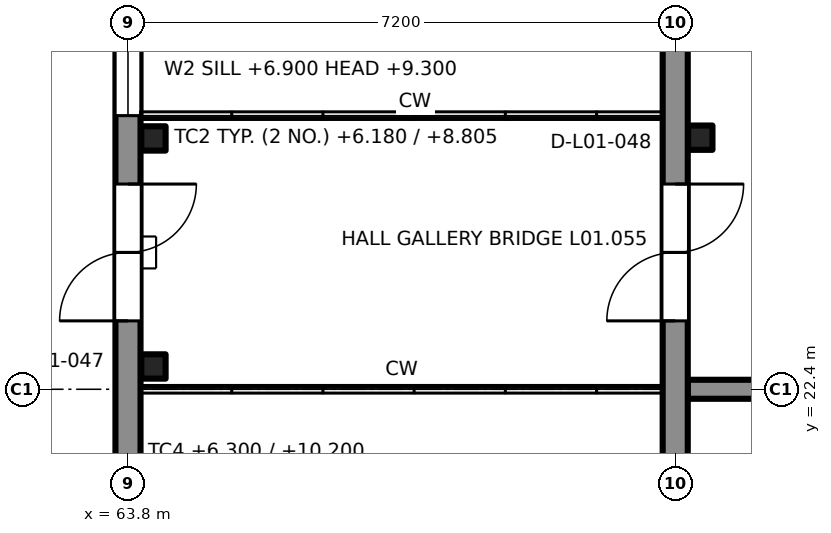
"""IFC4 building model, lengths in metres.
Left out: names, types, materials, properties, quantities, classifications, styles, units other than length and angle.
Written with IfcOpenShell. Run it as: python <this file> out.ifc"""

import sys

from ifc_helpers import new_model, si_unit, direction, frame, frame_2d, origin, origin_2d, place, context, subcontext, project, spatial, rectangle, extrude, element, fill, save


model = new_model("IFC4")
c1 = context("Model", 3, precision=1e-05, world=origin(), true_north=direction((0.0, 1.0)))
c2 = subcontext(c1, "Body", "Model", "MODEL_VIEW")
j1 = project(units=[si_unit("LENGTHUNIT", "METRE"), si_unit("PLANEANGLEUNIT", "RADIAN")], contexts=[c1])
p1 = place(None, origin())
s1 = spatial("IfcSite", under=j1, at=p1, CompositionType="ELEMENT")
p2 = place(p1, origin())
s2 = spatial("IfcBuilding", under=s1, at=p2, CompositionType="ELEMENT")
p3 = place(p2, frame((0.0, 0.0, 6.3)))
s3 = spatial("IfcBuildingStorey", under=s2, at=p3, CompositionType="ELEMENT", Elevation=6.3)
for number, where, z_axis, x_axis in (
    (1, (64.135, 22.7, -0.12), (0.0, 0.0, 1.0), (1.0, 0.0, 0.0)),
    (2, (64.135, 25.7, -0.12), (0.0, 0.0, 1.0), (1.0, 0.0, 0.0)),
):
    element("IfcColumn", number, at=place(p3, frame(where, z_axis=z_axis, x_axis=x_axis)), inside=s3, PredefinedType="COLUMN", context=c2, shape_type="SweptSolid", body=[
        extrude(rectangle(XDim=0.32, YDim=0.32, at=origin_2d()), origin(), (0.0, 0.0, 1.0), 2.625),
    ])
p4 = place(p3, frame((71.33, 25.71, 0.0), z_axis=(0.0, 0.0, 1.0), x_axis=(1.0, 0.0, 0.0)))
e3 = element("IfcColumn", 3, at=p4, inside=s3, PredefinedType="COLUMN", context=c2, shape_type="SweptSolid", body=[
    extrude(rectangle(XDim=0.32, YDim=0.32, at=origin_2d()), origin(), (0.0, 0.0, 1.0), 2.505),
])
p5 = place(p3, frame((71.165, 22.4, 0.0), z_axis=(0.0, 0.0, 1.0), x_axis=(1.0, 0.0, 0.0)))
e4 = element("IfcWall", 4, at=p5, inside=s3, PredefinedType="SHEAR", context=c2, shape_type="SweptSolid", body=[
    extrude(rectangle(XDim=6.855, YDim=0.25, at=frame_2d((3.427, 0.0))), origin(), (0.0, 0.0, 1.0), 3.65),
])
p6 = place(p5, frame((0.955, 0.0, 0.0)))
e5 = element("IfcOpeningElement", 5, at=p6, cuts=e4, PredefinedType="OPENING", context=c2, shape_type="SweptSolid", body=[
    extrude(rectangle(XDim=1.8, YDim=2.1, at=frame_2d((0.9, 1.05))), frame((0.0, 0.135, 0.0), z_axis=(0.0, -1.0, 0.0), x_axis=(1.0, 0.0, 0.0)), (0.0, 0.0, 1.0), 0.27),
])
p7 = place(p3, frame((71.0, 21.5, 0.0), z_axis=(0.0, 0.0, 1.0), x_axis=(0.0, 1.0, 0.0)))
e6 = element("IfcWall", 6, at=p7, inside=s3, PredefinedType="SOLIDWALL", context=c2, shape_type="SweptSolid", body=[
    extrude(rectangle(XDim=6.135, YDim=0.33, at=frame_2d((3.067, 0.0))), origin(), (0.0, 0.0, 1.0), 3.2),
])
p8 = place(p7, frame((1.8, 0.0, 0.0)))
e7 = element("IfcOpeningElement", 7, at=p8, cuts=e6, PredefinedType="OPENING", context=c2, shape_type="SweptSolid", body=[
    extrude(rectangle(XDim=1.8, YDim=2.4, at=frame_2d((0.9, 1.2))), frame((0.0, 0.175, 0.0), z_axis=(0.0, -1.0, 0.0), x_axis=(1.0, 0.0, 0.0)), (0.0, 0.0, 1.0), 0.35),
])
p9 = place(p3, frame((63.8, 27.6, 0.0), z_axis=(0.0, 0.0, 1.0), x_axis=(0.0, -1.0, 0.0)))
e8 = element("IfcWall", 8, at=p9, inside=s3, PredefinedType="SOLIDWALL", context=c2, shape_type="SweptSolid", body=[
    extrude(rectangle(XDim=6.8, YDim=0.33, at=frame_2d((3.4, 0.0))), origin(), (0.0, 0.0, 1.0), 3.3),
])
p10 = place(p9, frame((2.5, 0.0, 0.0)))
e9 = element("IfcOpeningElement", 9, at=p10, cuts=e8, PredefinedType="OPENING", context=c2, shape_type="SweptSolid", body=[
    extrude(rectangle(XDim=1.8, YDim=2.4, at=frame_2d((0.9, 1.2))), frame((0.0, 0.175, 0.0), z_axis=(0.0, -1.0, 0.0), x_axis=(1.0, 0.0, 0.0)), (0.0, 0.0, 1.0), 0.35),
])
p11 = place(p9, frame((0.4, 0.0, 0.6)))
e10 = element("IfcOpeningElement", 10, at=p11, cuts=e8, PredefinedType="OPENING", context=c2, shape_type="SweptSolid", body=[
    extrude(rectangle(XDim=1.2, YDim=2.4, at=frame_2d((0.6, 1.2))), frame((0.0, 0.175, 0.0), z_axis=(0.0, -1.0, 0.0), x_axis=(1.0, 0.0, 0.0)), (0.0, 0.0, 1.0), 0.35),
])
p12 = place(p8, origin())
e11 = element("IfcDoor", 11, at=p12, inside=s3, OperationType="DOUBLE_DOOR_SINGLE_SWING", PredefinedType="DOOR", context=c2, shape_type="SweptSolid", body=[
    extrude(rectangle(XDim=1.8, YDim=2.4, at=frame_2d((0.9, 1.2))), frame((0.0, 0.025, 0.0), z_axis=(0.0, -1.0, 0.0), x_axis=(1.0, 0.0, 0.0)), (0.0, 0.0, 1.0), 0.05),
])
fill(e7, e11)
p13 = place(p10, origin())
e12 = element("IfcDoor", 12, at=p13, inside=s3, OperationType="DOUBLE_DOOR_SINGLE_SWING", PredefinedType="DOOR", context=c2, shape_type="SweptSolid", body=[
    extrude(rectangle(XDim=1.8, YDim=2.4, at=frame_2d((0.9, 1.2))), frame((0.0, 0.025, 0.0), z_axis=(0.0, -1.0, 0.0), x_axis=(1.0, 0.0, 0.0)), (0.0, 0.0, 1.0), 0.05),
])
fill(e9, e12)
p14 = place(p11, origin())
e13 = element("IfcWindow", 13, at=p14, inside=s3, PartitioningType="SINGLE_PANEL", PredefinedType="WINDOW", context=c2, shape_type="SweptSolid", body=[
    extrude(rectangle(XDim=1.2, YDim=2.4, at=frame_2d((0.6, 1.2))), frame((0.0, -0.03, 0.0), z_axis=(0.0, -1.0, 0.0), x_axis=(1.0, 0.0, 0.0)), (0.0, 0.0, 1.0), 0.06),
])
fill(e10, e13)
save(model, sys.argv[1])
